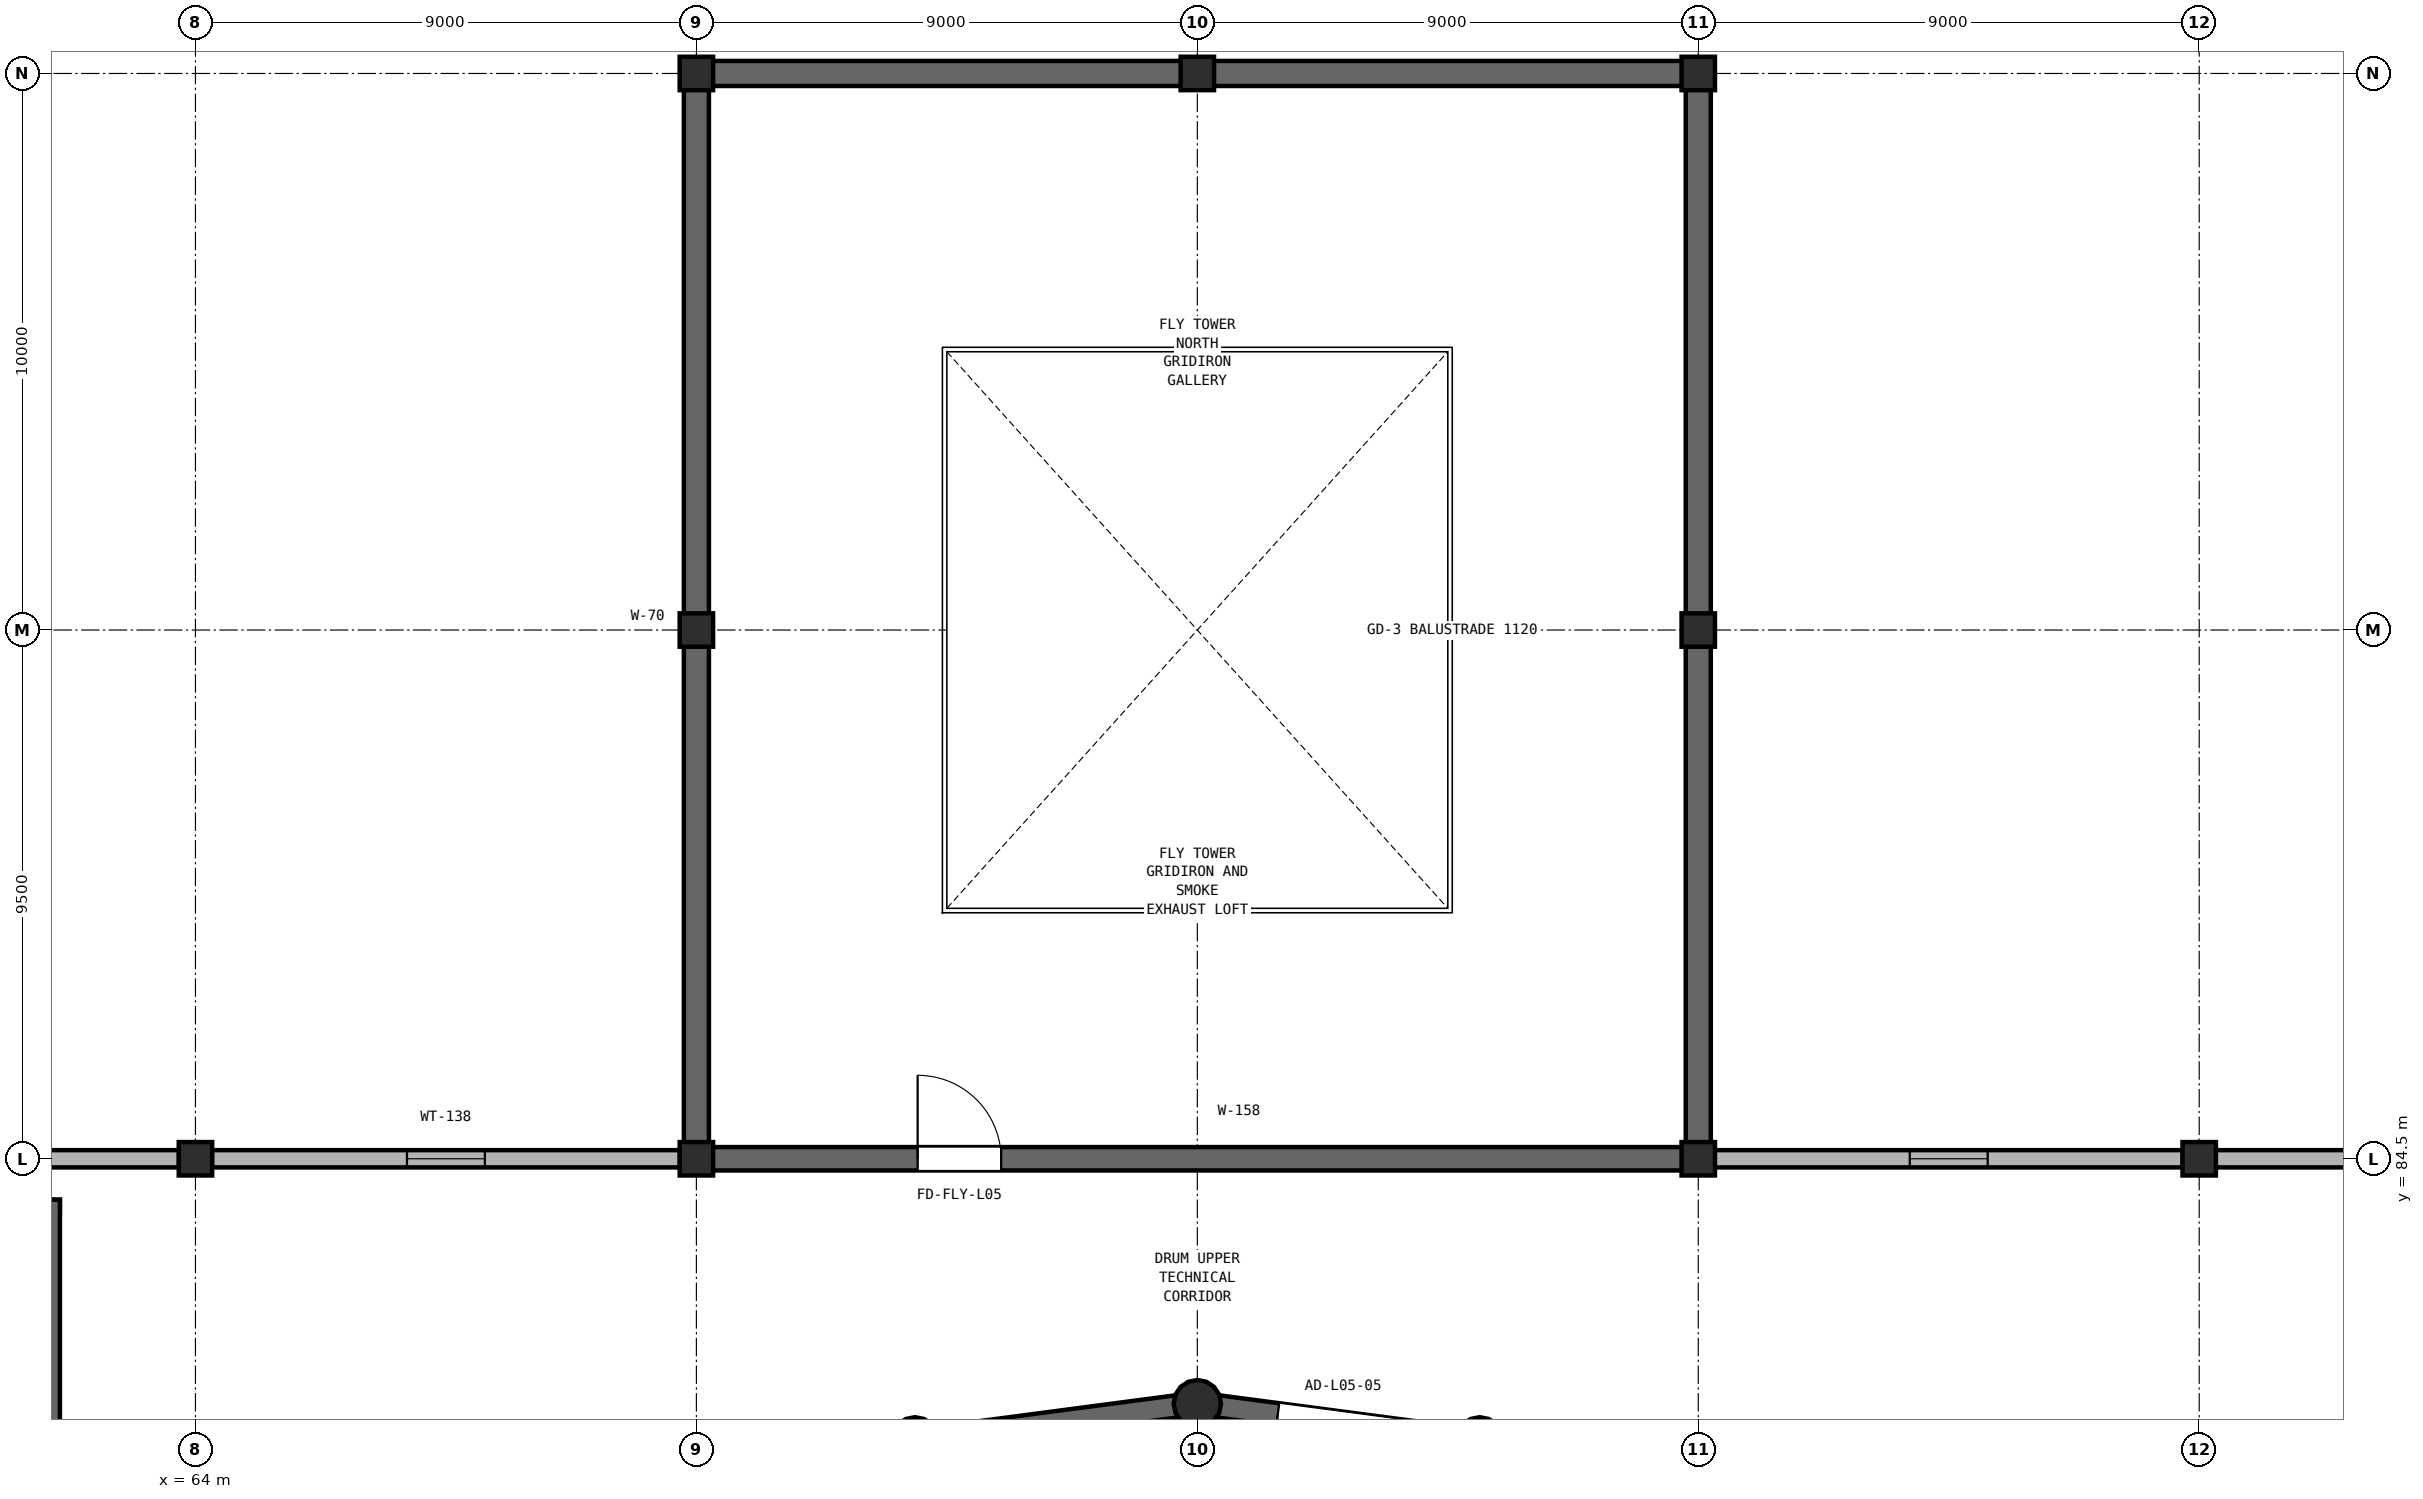
"""IFC4 building model, lengths in metres.
Left out: names, types, materials, properties, quantities, classifications, styles, units other than length and angle.
Written with IfcOpenShell. Run it as: python <this file> out.ifc"""

import sys

from ifc_helpers import new_model, si_unit, direction, frame, frame_2d, origin, origin_2d, place, context, subcontext, project, spatial, rectangle, circle, extrude, element, fill, save


model = new_model("IFC4")
c1 = context("Model", 3, precision=1e-05, world=origin(), true_north=direction((0.0, 1.0)))
c2 = subcontext(c1, "Body", "Model", "MODEL_VIEW")
j1 = project(units=[si_unit("LENGTHUNIT", "METRE"), si_unit("PLANEANGLEUNIT", "RADIAN")], contexts=[c1])
p1 = place(None, origin())
s1 = spatial("IfcSite", under=j1, at=p1, CompositionType="ELEMENT")
p2 = place(p1, origin())
s2 = spatial("IfcBuilding", under=s1, at=p2, CompositionType="ELEMENT")
p3 = place(p2, frame((0.0, 0.0, 23.7)))
s3 = spatial("IfcBuildingStorey", under=s2, at=p3, CompositionType="ELEMENT", Elevation=23.7)
for number, where, z_axis, x_axis in (
    (1, (64.0, 84.5, 0.0), (0.0, 0.0, 1.0), (1.0, 0.0, 0.0)),
    (2, (73.0, 84.5, 0.0), (0.0, 0.0, 1.0), (1.0, 0.0, 0.0)),
    (3, (73.0, 94.0, 0.0), (0.0, 0.0, 1.0), (1.0, 0.0, 0.0)),
    (4, (73.0, 104.0, 0.0), (0.0, 0.0, 1.0), (1.0, 0.0, 0.0)),
    (5, (82.0, 104.0, 0.0), (0.0, 0.0, 1.0), (1.0, 0.0, 0.0)),
    (6, (91.0, 84.5, 0.0), (0.0, 0.0, 1.0), (1.0, 0.0, 0.0)),
    (7, (91.0, 94.0, 0.0), (0.0, 0.0, 1.0), (1.0, 0.0, 0.0)),
    (8, (91.0, 104.0, 0.0), (0.0, 0.0, 1.0), (1.0, 0.0, 0.0)),
    (9, (100.0, 84.5, 0.0), (0.0, 0.0, 1.0), (1.0, 0.0, 0.0)),
):
    element("IfcColumn", number, at=place(p3, frame(where, z_axis=z_axis, x_axis=x_axis)), inside=s3, PredefinedType="COLUMN", context=c2, shape_type="SweptSolid", body=[
        extrude(rectangle(XDim=0.6, YDim=0.6, at=origin_2d()), origin(), (0.0, 0.0, 1.0), 4.28),
    ])
for number, where, z_axis, x_axis in (
    (10, (87.073, 79.432, 0.0), (0.0, 0.0, 1.0), (1.0, 0.0, 0.0)),
    (11, (82.0, 80.1, 0.0), (0.0, 0.0, 1.0), (1.0, 0.0, 0.0)),
    (12, (76.927, 79.432, 0.0), (0.0, 0.0, 1.0), (1.0, 0.0, 0.0)),
):
    element("IfcColumn", number, at=place(p3, frame(where, z_axis=z_axis, x_axis=x_axis)), inside=s3, PredefinedType="COLUMN", context=c2, shape_type="SweptSolid", body=[
        extrude(circle(Radius=0.425, at=origin_2d()), origin(), (0.0, 0.0, 1.0), 2.9),
    ])
p4 = place(p3, frame((87.073, 79.432, 0.0), z_axis=(0.0, 0.0, 1.0), x_axis=(-0.99143625958, 0.130591512704, 0.0)))
e13 = element("IfcWall", 13, at=p4, inside=s3, PredefinedType="SHEAR", context=c2, shape_type="SweptSolid", body=[
    extrude(rectangle(XDim=5.117, YDim=0.4, at=frame_2d((2.558, 0.0))), origin(), (0.0, 0.0, 1.0), 2.9),
])
p5 = place(p4, frame((1.458, 0.0, 0.0)))
e14 = element("IfcOpeningElement", 14, at=p5, cuts=e13, PredefinedType="OPENING", context=c2, shape_type="SweptSolid", body=[
    extrude(rectangle(XDim=2.2, YDim=2.45, at=frame_2d((1.1, 1.225))), frame((0.0, 0.21, 0.0), z_axis=(0.0, -1.0, 0.0), x_axis=(1.0, 0.0, 0.0)), (0.0, 0.0, 1.0), 0.42),
])
p6 = place(p3, frame((82.0, 80.1, 0.0), z_axis=(0.0, 0.0, 1.0), x_axis=(-0.99143625958, -0.130591512704, 0.0)))
e15 = element("IfcWall", 15, at=p6, inside=s3, PredefinedType="SHEAR", context=c2, shape_type="SweptSolid", body=[
    extrude(rectangle(XDim=5.117, YDim=0.4, at=frame_2d((2.558, 0.0))), origin(), (0.0, 0.0, 1.0), 2.9),
])
p7 = place(p3, frame((72.775, 104.0, 0.0), z_axis=(0.0, 0.0, 1.0), x_axis=(1.0, 0.0, 0.0)))
e16 = element("IfcWall", 16, at=p7, inside=s3, PredefinedType="SHEAR", context=c2, shape_type="SweptSolid", body=[
    extrude(rectangle(XDim=18.45, YDim=0.45, at=frame_2d((9.225, 0.0))), origin(), (0.0, 0.0, 1.0), 4.5),
])
p8 = place(p3, frame((72.775, 84.5, 0.0), z_axis=(0.0, 0.0, 1.0), x_axis=(1.0, 0.0, 0.0)))
e17 = element("IfcWall", 17, at=p8, inside=s3, PredefinedType="SHEAR", context=c2, shape_type="SweptSolid", body=[
    extrude(rectangle(XDim=18.45, YDim=0.42, at=frame_2d((9.225, 0.0))), origin(), (0.0, 0.0, 1.0), 4.5),
])
p9 = place(p8, frame((4.2, 0.0, 0.0)))
e18 = element("IfcOpeningElement", 18, at=p9, cuts=e17, PredefinedType="OPENING", context=c2, shape_type="SweptSolid", body=[
    extrude(rectangle(XDim=1.5, YDim=2.2, at=frame_2d((0.75, 1.1))), frame((0.0, 0.22, 0.0), z_axis=(0.0, -1.0, 0.0), x_axis=(1.0, 0.0, 0.0)), (0.0, 0.0, 1.0), 0.44),
])
for number, where, z_axis, x_axis in (
    (19, (73.0, 84.275, 0.0), (0.0, 0.0, 1.0), (0.0, 1.0, 0.0)),
    (20, (91.0, 84.275, 0.0), (0.0, 0.0, 1.0), (0.0, 1.0, 0.0)),
):
    element("IfcWall", number, at=place(p3, frame(where, z_axis=z_axis, x_axis=x_axis)), inside=s3, PredefinedType="SHEAR", context=c2, shape_type="SweptSolid", body=[
        extrude(rectangle(XDim=19.95, YDim=0.45, at=frame_2d((9.975, 0.0))), origin(), (0.0, 0.0, 1.0), 4.5),
    ])
p10 = place(p3, frame((55.296, 84.5, 0.0), z_axis=(0.0, 0.0, 1.0), x_axis=(1.0, 0.0, 0.0)))
e21 = element("IfcWall", 21, at=p10, inside=s3, PredefinedType="SOLIDWALL", context=c2, shape_type="SweptSolid", body=[
    extrude(rectangle(XDim=8.408, YDim=0.31, at=frame_2d((4.204, 0.0))), origin(), (0.0, 0.0, 1.0), 3.638),
])
p11 = place(p10, frame((3.504, 0.0, 0.85)))
e22 = element("IfcOpeningElement", 22, at=p11, cuts=e21, PredefinedType="OPENING", context=c2, shape_type="SweptSolid", body=[
    extrude(rectangle(XDim=1.4, YDim=1.65, at=frame_2d((0.7, 0.825))), frame((0.0, 0.165, 0.0), z_axis=(0.0, -1.0, 0.0), x_axis=(1.0, 0.0, 0.0)), (0.0, 0.0, 1.0), 0.33),
])
p12 = place(p3, frame((64.296, 84.5, 0.0), z_axis=(0.0, 0.0, 1.0), x_axis=(1.0, 0.0, 0.0)))
e23 = element("IfcWall", 23, at=p12, inside=s3, PredefinedType="SOLIDWALL", context=c2, shape_type="SweptSolid", body=[
    extrude(rectangle(XDim=8.408, YDim=0.31, at=frame_2d((4.204, 0.0))), origin(), (0.0, 0.0, 1.0), 3.847),
])
p13 = place(p12, frame((3.504, 0.0, 0.85)))
e24 = element("IfcOpeningElement", 24, at=p13, cuts=e23, PredefinedType="OPENING", context=c2, shape_type="SweptSolid", body=[
    extrude(rectangle(XDim=1.4, YDim=1.65, at=frame_2d((0.7, 0.825))), frame((0.0, 0.165, 0.0), z_axis=(0.0, -1.0, 0.0), x_axis=(1.0, 0.0, 0.0)), (0.0, 0.0, 1.0), 0.33),
])
p14 = place(p3, frame((91.296, 84.5, 0.0), z_axis=(0.0, 0.0, 1.0), x_axis=(1.0, 0.0, 0.0)))
e25 = element("IfcWall", 25, at=p14, inside=s3, PredefinedType="SOLIDWALL", context=c2, shape_type="SweptSolid", body=[
    extrude(rectangle(XDim=8.408, YDim=0.31, at=frame_2d((4.204, 0.0))), origin(), (0.0, 0.0, 1.0), 3.643),
])
p15 = place(p14, frame((3.504, 0.0, 0.85)))
e26 = element("IfcOpeningElement", 26, at=p15, cuts=e25, PredefinedType="OPENING", context=c2, shape_type="SweptSolid", body=[
    extrude(rectangle(XDim=1.4, YDim=1.65, at=frame_2d((0.7, 0.825))), frame((0.0, 0.165, 0.0), z_axis=(0.0, -1.0, 0.0), x_axis=(1.0, 0.0, 0.0)), (0.0, 0.0, 1.0), 0.33),
])
p16 = place(p3, frame((100.296, 84.5, 0.0), z_axis=(0.0, 0.0, 1.0), x_axis=(1.0, 0.0, 0.0)))
e27 = element("IfcWall", 27, at=p16, inside=s3, PredefinedType="SOLIDWALL", context=c2, shape_type="SweptSolid", body=[
    extrude(rectangle(XDim=8.408, YDim=0.31, at=frame_2d((4.204, 0.0))), origin(), (0.0, 0.0, 1.0), 3.638),
])
p17 = place(p16, frame((3.504, 0.0, 0.85)))
e28 = element("IfcOpeningElement", 28, at=p17, cuts=e27, PredefinedType="OPENING", context=c2, shape_type="SweptSolid", body=[
    extrude(rectangle(XDim=1.4, YDim=1.65, at=frame_2d((0.7, 0.825))), frame((0.0, 0.165, 0.0), z_axis=(0.0, -1.0, 0.0), x_axis=(1.0, 0.0, 0.0)), (0.0, 0.0, 1.0), 0.33),
])
p18 = place(p3, frame((57.115, 83.64, 0.0), z_axis=(0.0, 0.0, 1.0), x_axis=(1.0, 0.0, 0.0)))
e29 = element("IfcWall", 29, at=p18, inside=s3, PredefinedType="SHEAR", context=c2, shape_type="SweptSolid", body=[
    extrude(rectangle(XDim=4.45, YDim=0.25, at=frame_2d((2.225, 0.0))), origin(), (0.0, 0.0, 1.0), 4.28),
])
p19 = place(p3, frame((61.44, 72.675, 0.0), z_axis=(0.0, 0.0, 1.0), x_axis=(0.0, 1.0, 0.0)))
e30 = element("IfcWall", 30, at=p19, inside=s3, PredefinedType="SHEAR", context=c2, shape_type="SweptSolid", body=[
    extrude(rectangle(XDim=11.09, YDim=0.25, at=frame_2d((5.545, 0.0))), origin(), (0.0, 0.0, 1.0), 4.28),
])
p20 = place(p13, origin())
e31 = element("IfcWindow", 31, at=p20, inside=s3, PartitioningType="SINGLE_PANEL", PredefinedType="WINDOW", context=c2, shape_type="SweptSolid", body=[
    extrude(rectangle(XDim=1.4, YDim=1.65, at=frame_2d((0.7, 0.825))), frame((0.0, 0.03, 0.0), z_axis=(0.0, -1.0, 0.0), x_axis=(1.0, 0.0, 0.0)), (0.0, 0.0, 1.0), 0.06),
])
fill(e24, e31)
p21 = place(p15, origin())
e32 = element("IfcWindow", 32, at=p21, inside=s3, PartitioningType="SINGLE_PANEL", PredefinedType="WINDOW", context=c2, shape_type="SweptSolid", body=[
    extrude(rectangle(XDim=1.4, YDim=1.65, at=frame_2d((0.7, 0.825))), frame((0.0, 0.03, 0.0), z_axis=(0.0, -1.0, 0.0), x_axis=(1.0, 0.0, 0.0)), (0.0, 0.0, 1.0), 0.06),
])
fill(e26, e32)
p22 = place(p5, origin())
e33 = element("IfcDoor", 33, at=p22, inside=s3, OperationType="DOUBLE_DOOR_SINGLE_SWING", PredefinedType="DOOR", context=c2, shape_type="SweptSolid", body=[
    extrude(rectangle(XDim=2.2, YDim=2.45, at=frame_2d((1.1, 1.225))), frame((0.0, 0.025, 0.0), z_axis=(0.0, -1.0, 0.0), x_axis=(1.0, 0.0, 0.0)), (0.0, 0.0, 1.0), 0.05),
])
fill(e14, e33)
p23 = place(p9, origin())
e34 = element("IfcDoor", 34, at=p23, inside=s3, OperationType="SINGLE_SWING_LEFT", PredefinedType="DOOR", context=c2, shape_type="SweptSolid", body=[
    extrude(rectangle(XDim=1.5, YDim=2.2, at=frame_2d((0.75, 1.1))), frame((0.0, 0.025, 0.0), z_axis=(0.0, -1.0, 0.0), x_axis=(1.0, 0.0, 0.0)), (0.0, 0.0, 1.0), 0.05),
])
fill(e18, e34)
save(model, sys.argv[1])
